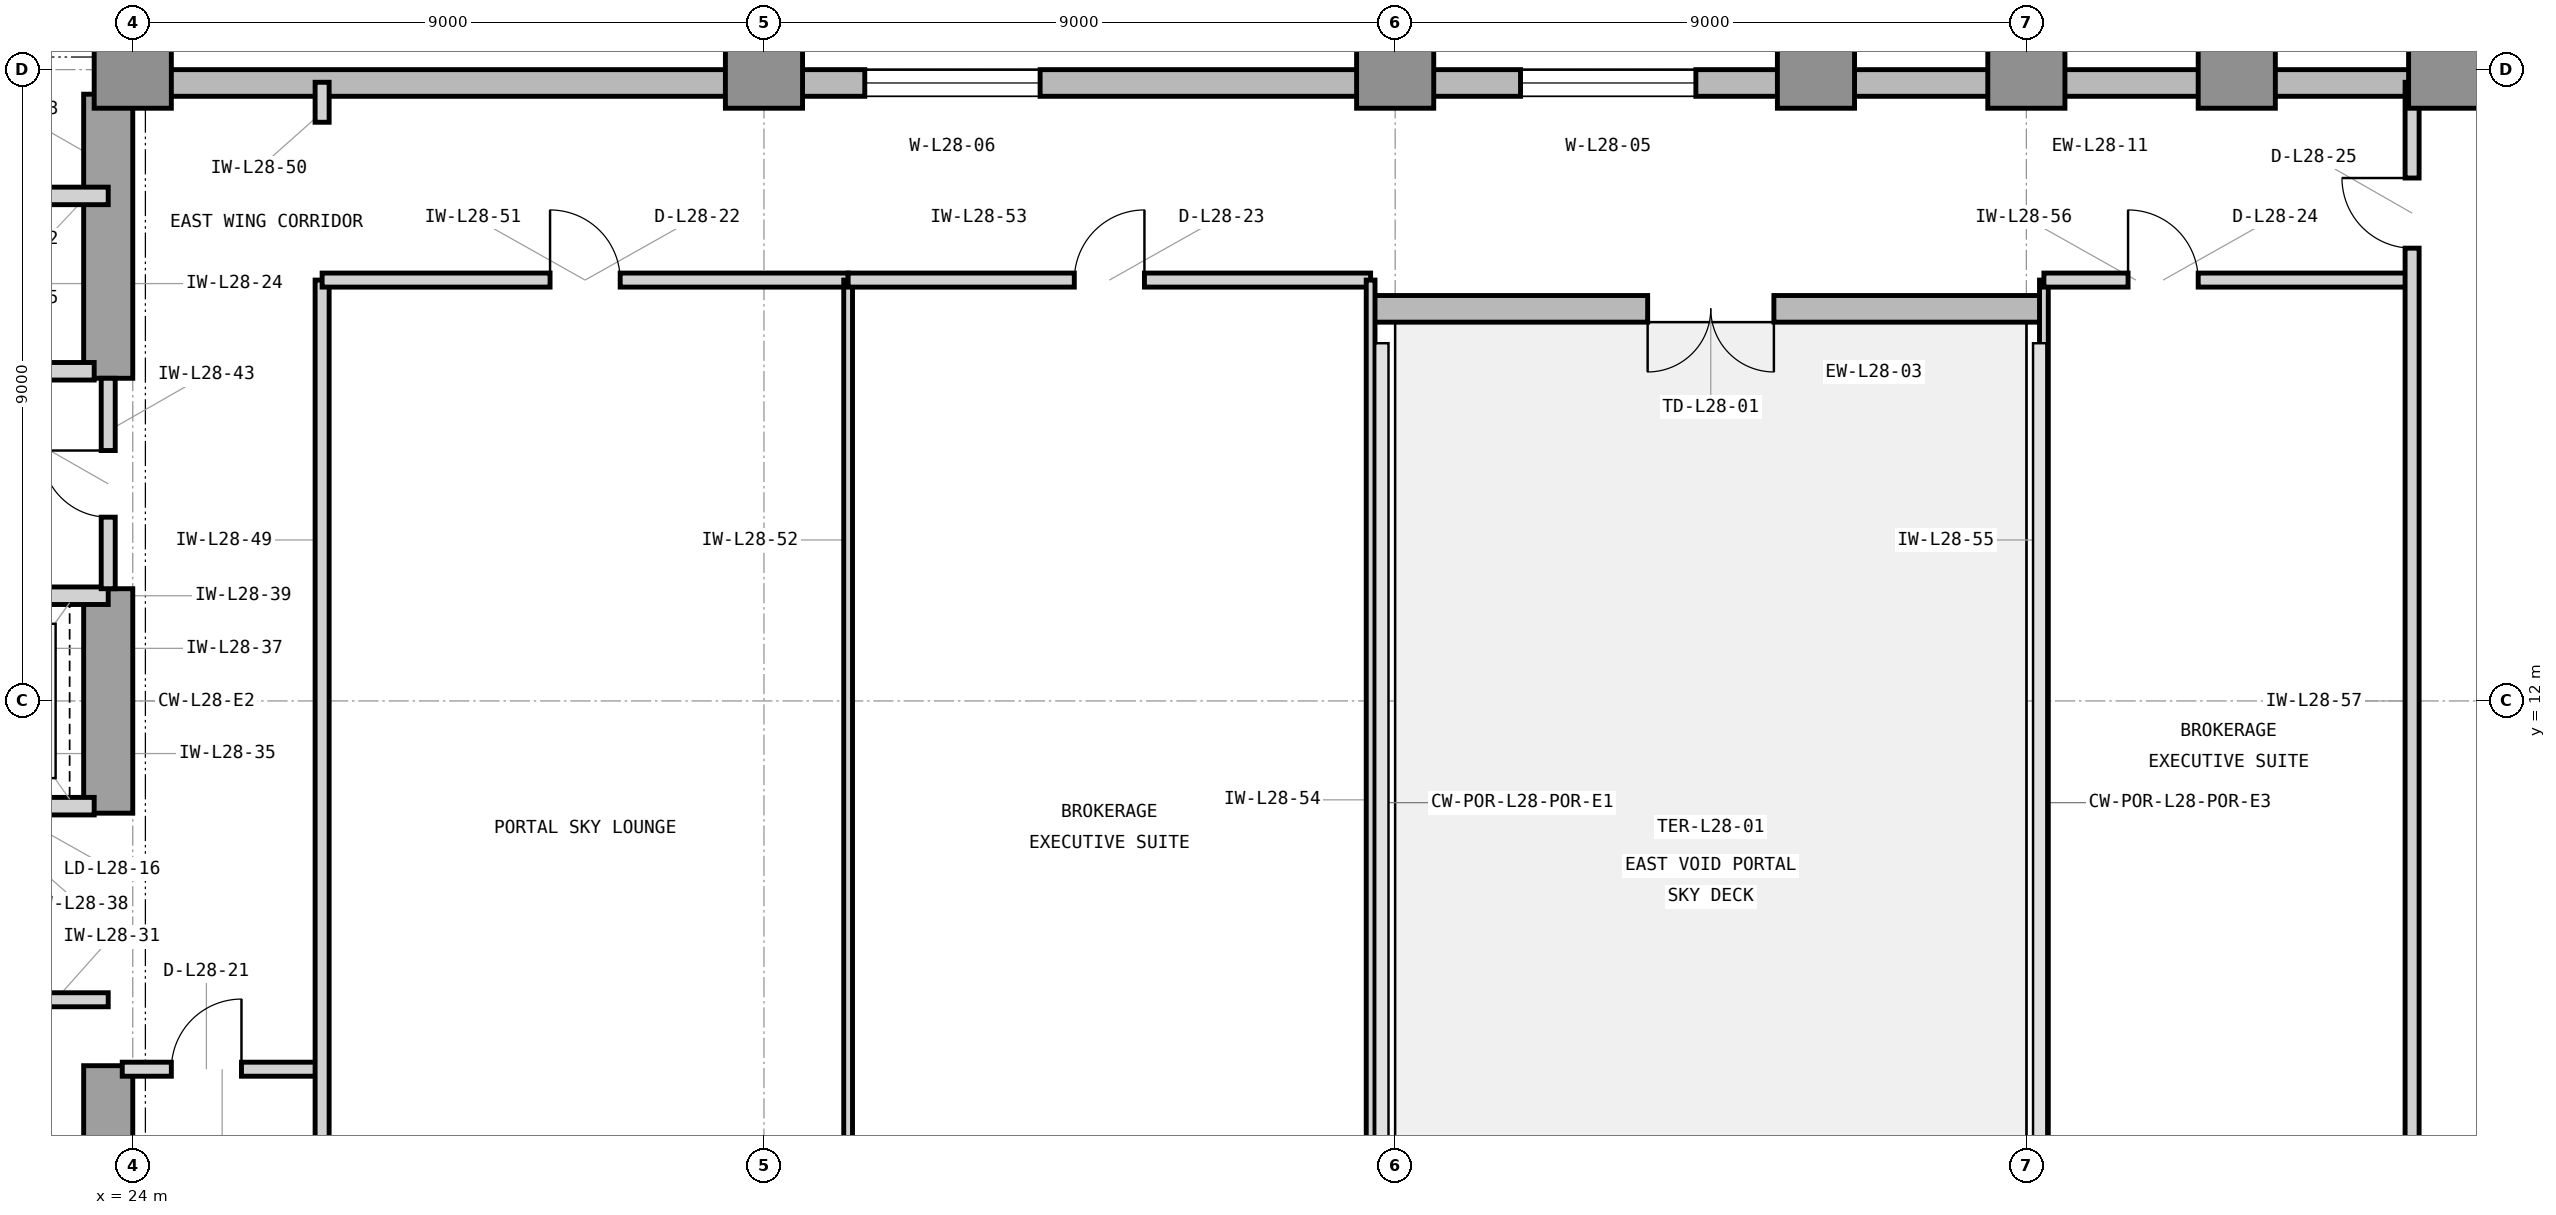
"""IFC4 building model, lengths in metres.
Left out: names, types, materials, properties, quantities, classifications, styles, units other than length and angle.
Written with IfcOpenShell. Run it as: python <this file> out.ifc"""

import sys

from ifc_helpers import new_model, si_unit, direction, frame, frame_2d, origin, origin_2d, place, context, subcontext, project, spatial, rectangle, extrude, element, fill, save


model = new_model("IFC4")
c1 = context("Model", 3, precision=1e-05, world=origin(), true_north=direction((0.0, 1.0)))
c2 = subcontext(c1, "Body", "Model", "MODEL_VIEW")
j1 = project(units=[si_unit("LENGTHUNIT", "METRE"), si_unit("PLANEANGLEUNIT", "RADIAN")], contexts=[c1])
p1 = place(None, origin())
s1 = spatial("IfcSite", under=j1, at=p1, CompositionType="ELEMENT")
p2 = place(p1, origin())
s2 = spatial("IfcBuilding", under=s1, at=p2, CompositionType="ELEMENT")
p3 = place(p2, frame((0.0, 0.0, 120.6)))
s3 = spatial("IfcBuildingStorey", under=s2, at=p3, CompositionType="ELEMENT", Elevation=120.6)
p4 = place(p3, frame((23.65, 3.7, 0.0), z_axis=(0.0, 0.0, 1.0), x_axis=(0.0, 1.0, 0.0)))
e1 = element("IfcWall", 1, at=p4, inside=s3, PredefinedType="SHEAR", context=c2, shape_type="SweptSolid", body=[
    extrude(rectangle(XDim=3.1, YDim=0.7, at=frame_2d((1.55, 0.0))), origin(), (0.0, 0.0, 1.0), 3.9),
])
p5 = place(p3, frame((23.65, 10.4, 0.0), z_axis=(0.0, 0.0, 1.0), x_axis=(0.0, 1.0, 0.0)))
e2 = element("IfcWall", 2, at=p5, inside=s3, PredefinedType="SHEAR", context=c2, shape_type="SweptSolid", body=[
    extrude(rectangle(XDim=3.2, YDim=0.7, at=frame_2d((1.6, 0.0))), origin(), (0.0, 0.0, 1.0), 3.9),
])
p6 = place(p3, frame((23.65, 16.6, 0.0), z_axis=(0.0, 0.0, 1.0), x_axis=(0.0, 1.0, 0.0)))
e3 = element("IfcWall", 3, at=p6, inside=s3, PredefinedType="SHEAR", context=c2, shape_type="SweptSolid", body=[
    extrude(rectangle(XDim=4.05, YDim=0.7, at=frame_2d((2.025, 0.0))), origin(), (0.0, 0.0, 1.0), 3.9),
])
for number, where, z_axis, x_axis in (
    (4, (24.0, 21.0, 0.0), (0.0, 0.0, 1.0), (1.0, 0.0, 0.0)),
    (5, (33.0, 21.0, 0.0), (0.0, 0.0, 1.0), (1.0, 0.0, 0.0)),
    (6, (42.0, 21.0, 0.0), (0.0, 0.0, 1.0), (1.0, 0.0, 0.0)),
    (7, (48.0, 21.0, 0.0), (0.0, 0.0, 1.0), (1.0, 0.0, 0.0)),
    (8, (51.0, 21.0, 0.0), (0.0, 0.0, 1.0), (1.0, 0.0, 0.0)),
    (9, (54.0, 21.0, 0.0), (0.0, 0.0, 1.0), (1.0, 0.0, 0.0)),
    (10, (57.0, 21.0, 0.0), (0.0, 0.0, 1.0), (1.0, 0.0, 0.0)),
):
    element("IfcColumn", number, at=place(p3, frame(where, z_axis=z_axis, x_axis=x_axis)), inside=s3, PredefinedType="COLUMN", context=c2, shape_type="SweptSolid", body=[
        extrude(rectangle(XDim=1.1, YDim=1.1, at=origin_2d()), origin(), (0.0, 0.0, 1.0), 3.9),
    ])
p7 = place(p3, frame((41.7, 17.59, 0.0), z_axis=(0.0, 0.0, 1.0), x_axis=(1.0, 0.0, 0.0)))
e11 = element("IfcWall", 11, at=p7, inside=s3, PredefinedType="STANDARD", context=c2, shape_type="SweptSolid", body=[
    extrude(rectangle(XDim=9.5, YDim=0.38, at=frame_2d((4.75, 0.0))), origin(), (0.0, 0.0, 1.0), 3.7),
])
p8 = place(p7, frame((3.9, 0.0, 0.0)))
e12 = element("IfcOpeningElement", 12, at=p8, cuts=e11, PredefinedType="OPENING", context=c2, shape_type="SweptSolid", body=[
    extrude(rectangle(XDim=1.8, YDim=2.35, at=frame_2d((0.9, 1.175))), frame((0.0, 0.2, 0.0), z_axis=(0.0, -1.0, 0.0), x_axis=(1.0, 0.0, 0.0)), (0.0, 0.0, 1.0), 0.4),
])
p9 = place(p3, frame((61.4, 20.81, 0.0), z_axis=(0.0, 0.0, 1.0), x_axis=(-1.0, 0.0, 0.0)))
e13 = element("IfcWall", 13, at=p9, inside=s3, PredefinedType="STANDARD", context=c2, shape_type="SweptSolid", body=[
    extrude(rectangle(XDim=37.4, YDim=0.38, at=frame_2d((18.7, 0.0))), origin(), (0.0, 0.0, 1.0), 3.7),
])
p10 = place(p9, frame((15.113, 0.0, 0.85)))
e14 = element("IfcOpeningElement", 14, at=p10, cuts=e13, PredefinedType="OPENING", context=c2, shape_type="SweptSolid", body=[
    extrude(rectangle(XDim=2.5, YDim=2.25, at=frame_2d((1.25, 1.125))), frame((0.0, 0.2, 0.0), z_axis=(0.0, -1.0, 0.0), x_axis=(1.0, 0.0, 0.0)), (0.0, 0.0, 1.0), 0.4),
])
p11 = place(p9, frame((24.462, 0.0, 0.85)))
e15 = element("IfcOpeningElement", 15, at=p11, cuts=e13, PredefinedType="OPENING", context=c2, shape_type="SweptSolid", body=[
    extrude(rectangle(XDim=2.5, YDim=2.25, at=frame_2d((1.25, 1.125))), frame((0.0, 0.2, 0.0), z_axis=(0.0, -1.0, 0.0), x_axis=(1.0, 0.0, 0.0)), (0.0, 0.0, 1.0), 0.4),
])
p12 = place(p3, frame((23.81, 21.0, 0.0), z_axis=(0.0, 0.0, 1.0), x_axis=(0.0, 1.0, 0.0)))
e16 = element("IfcWall", 16, at=p12, inside=s3, PredefinedType="STANDARD", context=c2, shape_type="SweptSolid", body=[
    extrude(rectangle(XDim=25.4, YDim=0.38, at=frame_2d((12.7, 0.0))), origin(), (0.0, 0.0, 1.0), 3.7),
])
p13 = place(p12, frame((11.45, 0.0, 0.85)))
e17 = element("IfcOpeningElement", 17, at=p13, cuts=e16, PredefinedType="OPENING", context=c2, shape_type="SweptSolid", body=[
    extrude(rectangle(XDim=2.5, YDim=2.25, at=frame_2d((1.25, 1.125))), frame((0.0, 0.2, 0.0), z_axis=(0.0, -1.0, 0.0), x_axis=(1.0, 0.0, 0.0)), (0.0, 0.0, 1.0), 0.4),
])
p14 = place(p3, frame((21.05, 16.7, 0.0), z_axis=(0.0, 0.0, 1.0), x_axis=(1.0, 0.0, 0.0)))
e18 = element("IfcWall", 18, at=p14, inside=s3, PredefinedType="PARTITIONING", context=c2, shape_type="SweptSolid", body=[
    extrude(rectangle(XDim=2.4, YDim=0.25, at=frame_2d((1.2, 0.0))), origin(), (0.0, 0.0, 1.0), 3.227),
])
p15 = place(p3, frame((16.45, 19.2, 0.0), z_axis=(0.0, 0.0, 1.0), x_axis=(1.0, 0.0, 0.0)))
e19 = element("IfcWall", 19, at=p15, inside=s3, PredefinedType="PARTITIONING", context=c2, shape_type="SweptSolid", body=[
    extrude(rectangle(XDim=7.2, YDim=0.25, at=frame_2d((3.6, 0.0))), origin(), (0.0, 0.0, 1.0), 3.69),
])
p16 = place(p3, frame((20.65, 7.74, 0.0), z_axis=(0.0, 0.0, 1.0), x_axis=(1.0, 0.0, 0.0)))
e20 = element("IfcWall", 20, at=p16, inside=s3, PredefinedType="PARTITIONING", context=c2, shape_type="SweptSolid", body=[
    extrude(rectangle(XDim=3.0, YDim=0.2, at=frame_2d((1.5, 0.0))), origin(), (0.0, 0.0, 1.0), 3.69),
])
p17 = place(p16, frame((1.025, 0.0, 0.0)))
e21 = element("IfcOpeningElement", 21, at=p17, cuts=e20, PredefinedType="OPENING", context=c2, shape_type="SweptSolid", body=[
    extrude(rectangle(XDim=0.95, YDim=2.1, at=frame_2d((0.475, 1.05))), frame((0.0, 0.11, 0.0), z_axis=(0.0, -1.0, 0.0), x_axis=(1.0, 0.0, 0.0)), (0.0, 0.0, 1.0), 0.22),
])
p18 = place(p3, frame((21.05, 10.5, 0.0), z_axis=(0.0, 0.0, 1.0), x_axis=(1.0, 0.0, 0.0)))
e22 = element("IfcWall", 22, at=p18, inside=s3, PredefinedType="PARTITIONING", context=c2, shape_type="SweptSolid", body=[
    extrude(rectangle(XDim=2.4, YDim=0.25, at=frame_2d((1.2, 0.0))), origin(), (0.0, 0.0, 1.0), 3.227),
])
p19 = place(p18, frame((0.48, 0.0, 0.0)))
e23 = element("IfcOpeningElement", 23, at=p19, cuts=e22, PredefinedType="OPENING", context=c2, shape_type="SweptSolid", body=[
    extrude(rectangle(XDim=1.15, YDim=2.25, at=frame_2d((0.575, 1.125))), frame((0.0, 0.135, 0.0), z_axis=(0.0, -1.0, 0.0), x_axis=(1.0, 0.0, 0.0)), (0.0, 0.0, 1.0), 0.27),
])
p20 = place(p3, frame((14.7, 13.5, 0.0), z_axis=(0.0, 0.0, 1.0), x_axis=(1.0, 0.0, 0.0)))
e24 = element("IfcWall", 24, at=p20, inside=s3, PredefinedType="PARTITIONING", context=c2, shape_type="SweptSolid", body=[
    extrude(rectangle(XDim=8.95, YDim=0.25, at=frame_2d((4.475, 0.0))), origin(), (0.0, 0.0, 1.0), 3.227),
])
p21 = place(p3, frame((23.65, 13.6, 0.0), z_axis=(0.0, 0.0, 1.0), x_axis=(0.0, 1.0, 0.0)))
e25 = element("IfcWall", 25, at=p21, inside=s3, PredefinedType="PARTITIONING", context=c2, shape_type="SweptSolid", body=[
    extrude(rectangle(XDim=3.0, YDim=0.2, at=frame_2d((1.5, 0.0))), origin(), (0.0, 0.0, 1.0), 3.69),
])
p22 = place(p21, frame((1.02, 0.0, 0.0)))
e26 = element("IfcOpeningElement", 26, at=p22, cuts=e25, PredefinedType="OPENING", context=c2, shape_type="SweptSolid", body=[
    extrude(rectangle(XDim=0.95, YDim=2.1, at=frame_2d((0.475, 1.05))), frame((0.0, 0.11, 0.0), z_axis=(0.0, -1.0, 0.0), x_axis=(1.0, 0.0, 0.0)), (0.0, 0.0, 1.0), 0.22),
])
p23 = place(p3, frame((23.85, 6.75, 0.0), z_axis=(0.0, 0.0, 1.0), x_axis=(1.0, 0.0, 0.0)))
e27 = element("IfcWall", 27, at=p23, inside=s3, PredefinedType="PARTITIONING", context=c2, shape_type="SweptSolid", body=[
    extrude(rectangle(XDim=2.85, YDim=0.2, at=frame_2d((1.425, 0.0))), origin(), (0.0, 0.0, 1.0), 3.69),
])
p24 = place(p23, frame((0.7, 0.0, 0.0)))
e28 = element("IfcOpeningElement", 28, at=p24, cuts=e27, PredefinedType="OPENING", context=c2, shape_type="SweptSolid", body=[
    extrude(rectangle(XDim=1.0, YDim=2.15, at=frame_2d((0.5, 1.075))), frame((0.0, 0.11, 0.0), z_axis=(0.0, -1.0, 0.0), x_axis=(1.0, 0.0, 0.0)), (0.0, 0.0, 1.0), 0.22),
])
p25 = place(p3, frame((26.7, 3.18, 0.0), z_axis=(0.0, 0.0, 1.0), x_axis=(0.0, 1.0, 0.0)))
e29 = element("IfcWall", 29, at=p25, inside=s3, PredefinedType="PARTITIONING", context=c2, shape_type="SweptSolid", body=[
    extrude(rectangle(XDim=14.82, YDim=0.2, at=frame_2d((7.41, 0.0))), origin(), (0.0, 0.0, 1.0), 3.69),
])
p26 = place(p3, frame((26.7, 20.25, 0.0), z_axis=(0.0, 0.0, 1.0), x_axis=(0.0, 1.0, 0.0)))
e30 = element("IfcWall", 30, at=p26, inside=s3, PredefinedType="PARTITIONING", context=c2, shape_type="SweptSolid", body=[
    extrude(rectangle(XDim=0.57, YDim=0.2, at=frame_2d((0.285, 0.0))), origin(), (0.0, 0.0, 1.0), 3.69),
])
p27 = place(p3, frame((26.7, 18.0, 0.0), z_axis=(0.0, 0.0, 1.0), x_axis=(1.0, 0.0, 0.0)))
e31 = element("IfcWall", 31, at=p27, inside=s3, PredefinedType="PARTITIONING", context=c2, shape_type="SweptSolid", body=[
    extrude(rectangle(XDim=7.5, YDim=0.2, at=frame_2d((3.75, 0.0))), origin(), (0.0, 0.0, 1.0), 3.227),
])
p28 = place(p27, frame((3.25, 0.0, 0.0)))
e32 = element("IfcOpeningElement", 32, at=p28, cuts=e31, PredefinedType="OPENING", context=c2, shape_type="SweptSolid", body=[
    extrude(rectangle(XDim=1.0, YDim=2.15, at=frame_2d((0.5, 1.075))), frame((0.0, 0.11, 0.0), z_axis=(0.0, -1.0, 0.0), x_axis=(1.0, 0.0, 0.0)), (0.0, 0.0, 1.0), 0.22),
])
p29 = place(p3, frame((34.2, 3.18, 0.0), z_axis=(0.0, 0.0, 1.0), x_axis=(0.0, 1.0, 0.0)))
e33 = element("IfcWall", 33, at=p29, inside=s3, PredefinedType="PARTITIONING", context=c2, shape_type="SweptSolid", body=[
    extrude(rectangle(XDim=14.82, YDim=0.125, at=frame_2d((7.41, 0.0))), origin(), (0.0, 0.0, 1.0), 3.69),
])
p30 = place(p3, frame((34.2, 18.0, 0.0), z_axis=(0.0, 0.0, 1.0), x_axis=(1.0, 0.0, 0.0)))
e34 = element("IfcWall", 34, at=p30, inside=s3, PredefinedType="PARTITIONING", context=c2, shape_type="SweptSolid", body=[
    extrude(rectangle(XDim=7.45, YDim=0.2, at=frame_2d((3.725, 0.0))), origin(), (0.0, 0.0, 1.0), 3.227),
])
p31 = place(p30, frame((3.225, 0.0, 0.0)))
e35 = element("IfcOpeningElement", 35, at=p31, cuts=e34, PredefinedType="OPENING", context=c2, shape_type="SweptSolid", body=[
    extrude(rectangle(XDim=1.0, YDim=2.15, at=frame_2d((0.5, 1.075))), frame((0.0, 0.11, 0.0), z_axis=(0.0, -1.0, 0.0), x_axis=(1.0, 0.0, 0.0)), (0.0, 0.0, 1.0), 0.22),
])
for number, where, z_axis, x_axis in (
    (36, (41.65, 3.18, 0.0), (0.0, 0.0, 1.0), (0.0, 1.0, 0.0)),
    (37, (51.25, 3.18, 0.0), (0.0, 0.0, 1.0), (0.0, 1.0, 0.0)),
):
    element("IfcWall", number, at=place(p3, frame(where, z_axis=z_axis, x_axis=x_axis)), inside=s3, PredefinedType="PARTITIONING", context=c2, shape_type="SweptSolid", body=[
        extrude(rectangle(XDim=14.82, YDim=0.125, at=frame_2d((7.41, 0.0))), origin(), (0.0, 0.0, 1.0), 3.69),
    ])
p32 = place(p3, frame((51.25, 18.0, 0.0), z_axis=(0.0, 0.0, 1.0), x_axis=(1.0, 0.0, 0.0)))
e38 = element("IfcWall", 38, at=p32, inside=s3, PredefinedType="PARTITIONING", context=c2, shape_type="SweptSolid", body=[
    extrude(rectangle(XDim=5.25, YDim=0.2, at=frame_2d((2.625, 0.0))), origin(), (0.0, 0.0, 1.0), 3.227),
])
p33 = place(p32, frame((1.2, 0.0, 0.0)))
e39 = element("IfcOpeningElement", 39, at=p33, cuts=e38, PredefinedType="OPENING", context=c2, shape_type="SweptSolid", body=[
    extrude(rectangle(XDim=1.0, YDim=2.15, at=frame_2d((0.5, 1.075))), frame((0.0, 0.11, 0.0), z_axis=(0.0, -1.0, 0.0), x_axis=(1.0, 0.0, 0.0)), (0.0, 0.0, 1.0), 0.22),
])
p34 = place(p3, frame((56.5, 3.18, 0.0), z_axis=(0.0, 0.0, 1.0), x_axis=(0.0, 1.0, 0.0)))
e40 = element("IfcWall", 40, at=p34, inside=s3, PredefinedType="PARTITIONING", context=c2, shape_type="SweptSolid", body=[
    extrude(rectangle(XDim=17.64, YDim=0.2, at=frame_2d((8.82, 0.0))), origin(), (0.0, 0.0, 1.0), 3.69),
])
p35 = place(p34, frame((15.275, 0.0, 0.0)))
e41 = element("IfcOpeningElement", 41, at=p35, cuts=e40, PredefinedType="OPENING", context=c2, shape_type="SweptSolid", body=[
    extrude(rectangle(XDim=1.0, YDim=2.15, at=frame_2d((0.5, 1.075))), frame((0.0, 0.11, 0.0), z_axis=(0.0, -1.0, 0.0), x_axis=(1.0, 0.0, 0.0)), (0.0, 0.0, 1.0), 0.22),
])
p36 = place(p8, frame((1.8, 0.0, 0.0), z_axis=(0.0, 0.0, 1.0), x_axis=(-1.0, 0.0, 0.0)))
e42 = element("IfcDoor", 42, at=p36, inside=s3, OperationType="DOUBLE_DOOR_SINGLE_SWING", PredefinedType="DOOR", context=c2, shape_type="SweptSolid", body=[
    extrude(rectangle(XDim=1.8, YDim=2.35, at=frame_2d((0.9, 1.175))), frame((0.0, 0.025, 0.0), z_axis=(0.0, -1.0, 0.0), x_axis=(1.0, 0.0, 0.0)), (0.0, 0.0, 1.0), 0.05),
])
fill(e12, e42)
p37 = place(p10, origin())
e43 = element("IfcWindow", 43, at=p37, inside=s3, PartitioningType="SINGLE_PANEL", PredefinedType="WINDOW", context=c2, shape_type="SweptSolid", body=[
    extrude(rectangle(XDim=2.5, YDim=2.25, at=frame_2d((1.25, 1.125))), frame((0.0, 0.11, 0.0), z_axis=(0.0, -1.0, 0.0), x_axis=(1.0, 0.0, 0.0)), (0.0, 0.0, 1.0), 0.06),
])
fill(e14, e43)
p38 = place(p11, origin())
e44 = element("IfcWindow", 44, at=p38, inside=s3, PartitioningType="SINGLE_PANEL", PredefinedType="WINDOW", context=c2, shape_type="SweptSolid", body=[
    extrude(rectangle(XDim=2.5, YDim=2.25, at=frame_2d((1.25, 1.125))), frame((0.0, 0.11, 0.0), z_axis=(0.0, -1.0, 0.0), x_axis=(1.0, 0.0, 0.0)), (0.0, 0.0, 1.0), 0.06),
])
fill(e15, e44)
p39 = place(p22, origin())
e45 = element("IfcDoor", 45, at=p39, inside=s3, OperationType="SINGLE_SWING_RIGHT", PredefinedType="DOOR", context=c2, shape_type="SweptSolid", body=[
    extrude(rectangle(XDim=0.95, YDim=2.1, at=frame_2d((0.475, 1.05))), frame((0.0, 0.025, 0.0), z_axis=(0.0, -1.0, 0.0), x_axis=(1.0, 0.0, 0.0)), (0.0, 0.0, 1.0), 0.05),
])
fill(e26, e45)
p40 = place(p24, origin())
e46 = element("IfcDoor", 46, at=p40, inside=s3, OperationType="SINGLE_SWING_RIGHT", PredefinedType="DOOR", context=c2, shape_type="SweptSolid", body=[
    extrude(rectangle(XDim=1.0, YDim=2.15, at=frame_2d((0.5, 1.075))), frame((0.0, 0.025, 0.0), z_axis=(0.0, -1.0, 0.0), x_axis=(1.0, 0.0, 0.0)), (0.0, 0.0, 1.0), 0.05),
])
fill(e28, e46)
p41 = place(p28, origin())
e47 = element("IfcDoor", 47, at=p41, inside=s3, OperationType="SINGLE_SWING_LEFT", PredefinedType="DOOR", context=c2, shape_type="SweptSolid", body=[
    extrude(rectangle(XDim=1.0, YDim=2.15, at=frame_2d((0.5, 1.075))), frame((0.0, 0.025, 0.0), z_axis=(0.0, -1.0, 0.0), x_axis=(1.0, 0.0, 0.0)), (0.0, 0.0, 1.0), 0.05),
])
fill(e32, e47)
p42 = place(p31, origin())
e48 = element("IfcDoor", 48, at=p42, inside=s3, OperationType="SINGLE_SWING_RIGHT", PredefinedType="DOOR", context=c2, shape_type="SweptSolid", body=[
    extrude(rectangle(XDim=1.0, YDim=2.15, at=frame_2d((0.5, 1.075))), frame((0.0, 0.025, 0.0), z_axis=(0.0, -1.0, 0.0), x_axis=(1.0, 0.0, 0.0)), (0.0, 0.0, 1.0), 0.05),
])
fill(e35, e48)
p43 = place(p33, origin())
e49 = element("IfcDoor", 49, at=p43, inside=s3, OperationType="SINGLE_SWING_LEFT", PredefinedType="DOOR", context=c2, shape_type="SweptSolid", body=[
    extrude(rectangle(XDim=1.0, YDim=2.15, at=frame_2d((0.5, 1.075))), frame((0.0, 0.025, 0.0), z_axis=(0.0, -1.0, 0.0), x_axis=(1.0, 0.0, 0.0)), (0.0, 0.0, 1.0), 0.05),
])
fill(e39, e49)
p44 = place(p35, origin())
e50 = element("IfcDoor", 50, at=p44, inside=s3, OperationType="SINGLE_SWING_RIGHT", PredefinedType="DOOR", context=c2, shape_type="SweptSolid", body=[
    extrude(rectangle(XDim=1.0, YDim=2.15, at=frame_2d((0.5, 1.075))), frame((0.0, 0.025, 0.0), z_axis=(0.0, -1.0, 0.0), x_axis=(1.0, 0.0, 0.0)), (0.0, 0.0, 1.0), 0.05),
])
fill(e41, e50)
save(model, sys.argv[1])
